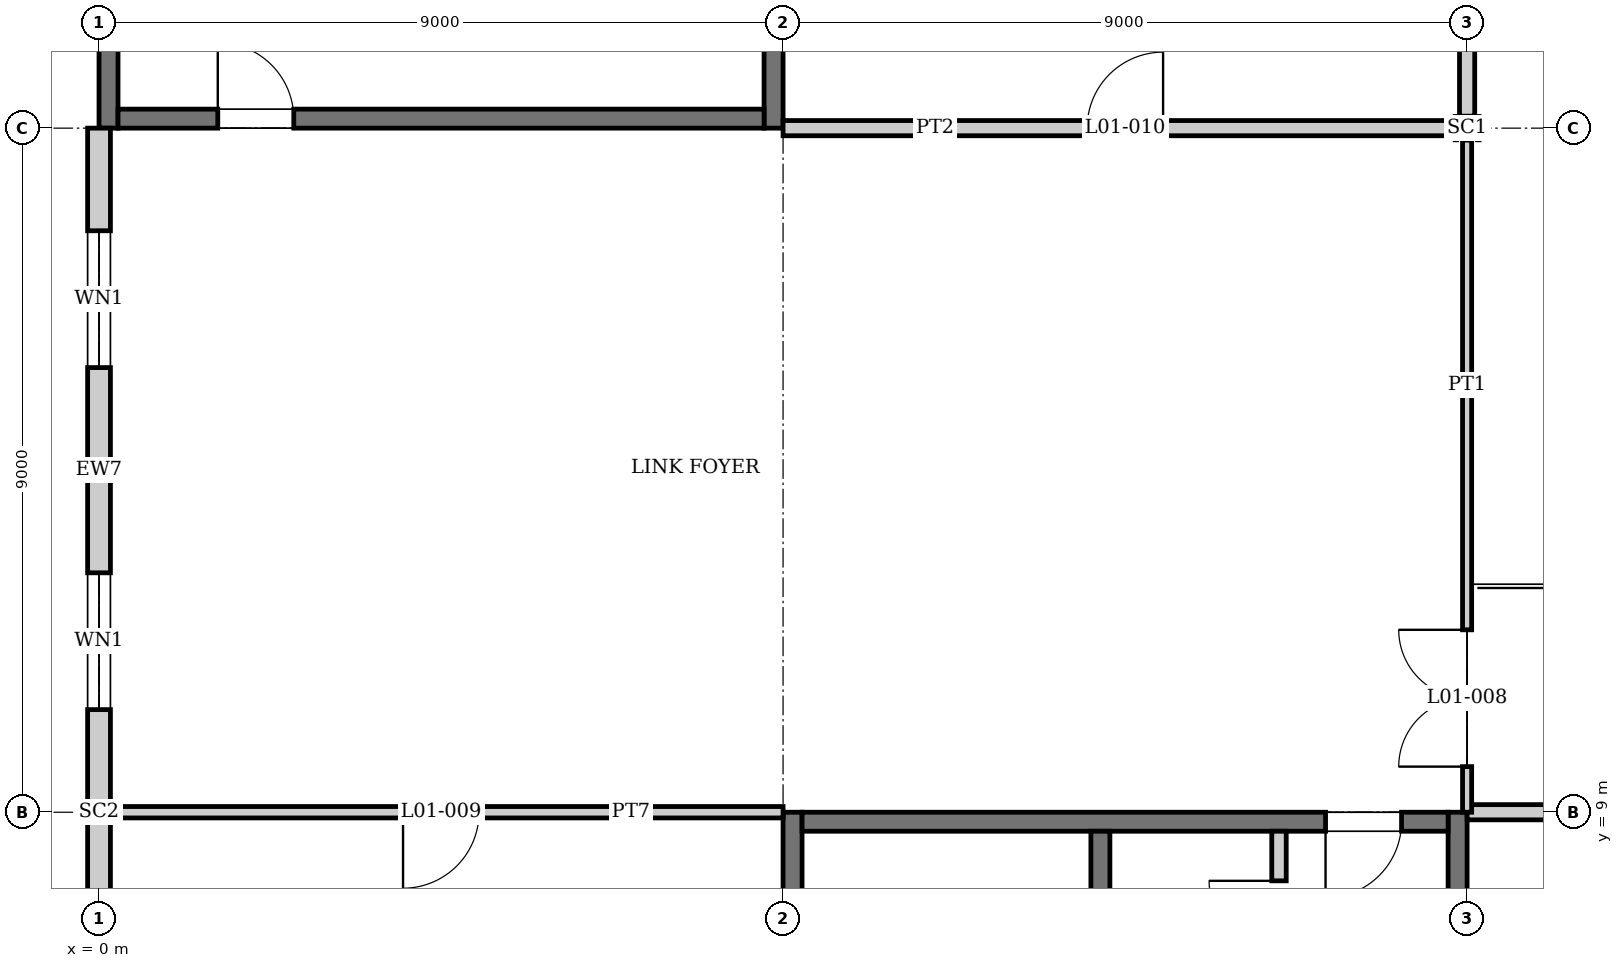
"""IFC4 building model, lengths in metres.
Left out: names, types, materials, properties, quantities, classifications, styles, units other than length and angle.
Written with IfcOpenShell. Run it as: python <this file> out.ifc"""

import sys

from ifc_helpers import new_model, si_unit, direction, frame, frame_2d, origin, origin_2d, place, context, subcontext, project, spatial, rectangle, i_section, extrude, element, fill, save


model = new_model("IFC4")
c1 = context("Model", 3, precision=1e-05, world=origin(), true_north=direction((0.0, 1.0)))
c2 = subcontext(c1, "Body", "Model", "MODEL_VIEW")
j1 = project(units=[si_unit("LENGTHUNIT", "METRE"), si_unit("PLANEANGLEUNIT", "RADIAN")], contexts=[c1])
p1 = place(None, origin())
s1 = spatial("IfcSite", under=j1, at=p1, CompositionType="ELEMENT")
p2 = place(p1, origin())
s2 = spatial("IfcBuilding", under=s1, at=p2, CompositionType="ELEMENT")
p3 = place(p2, frame((0.0, 0.0, 6.0)))
s3 = spatial("IfcBuildingStorey", under=s2, at=p3, CompositionType="ELEMENT", Elevation=6.0)
p4 = place(p3, frame((0.0, 9.0, 0.0), z_axis=(0.0, 0.0, 1.0), x_axis=(0.0, 1.0, 0.0)))
e1 = element("IfcColumn", 1, at=p4, inside=s3, PredefinedType="COLUMN", context=c2, shape_type="SweptSolid", body=[
    extrude(i_section(OverallWidth=0.256, OverallDepth=0.26, WebThickness=0.01, FlangeThickness=0.017, at=origin_2d()), origin(), (0.0, 0.0, 1.0), 4.5),
])
p5 = place(p3, frame((18.0, 18.0, 0.0), z_axis=(0.0, 0.0, 1.0), x_axis=(0.0, 1.0, 0.0)))
e2 = element("IfcColumn", 2, at=p5, inside=s3, PredefinedType="COLUMN", context=c2, shape_type="SweptSolid", body=[
    extrude(i_section(OverallWidth=0.307, OverallDepth=0.315, WebThickness=0.012, FlangeThickness=0.019, at=origin_2d()), origin(), (0.0, 0.0, 1.0), 4.5),
])
for number, where, z_axis, x_axis in (
    (3, (9.125, 0.0, 0.0), (0.0, 0.0, 1.0), (0.0, 1.0, 0.0)),
    (4, (17.875, 0.0, 0.0), (0.0, 0.0, 1.0), (0.0, 1.0, 0.0)),
):
    element("IfcWall", number, at=place(p3, frame(where, z_axis=z_axis, x_axis=x_axis)), inside=s3, PredefinedType="SHEAR", context=c2, shape_type="SweptSolid", body=[
        extrude(rectangle(XDim=9.0, YDim=0.25, at=frame_2d((4.5, 0.0))), origin(), (0.0, 0.0, 1.0), 4.5),
    ])
p6 = place(p3, frame((9.25, 8.875, 0.0), z_axis=(0.0, 0.0, 1.0), x_axis=(1.0, 0.0, 0.0)))
e5 = element("IfcWall", 5, at=p6, inside=s3, PredefinedType="SHEAR", context=c2, shape_type="SweptSolid", body=[
    extrude(rectangle(XDim=8.5, YDim=0.25, at=frame_2d((4.25, 0.0))), origin(), (0.0, 0.0, 1.0), 4.5),
])
p7 = place(p6, frame((6.887, 0.0, 0.0)))
e6 = element("IfcOpeningElement", 6, at=p7, cuts=e5, PredefinedType="OPENING", context=c2, shape_type="SweptSolid", body=[
    extrude(rectangle(XDim=1.0, YDim=2.1, at=frame_2d((0.5, 1.05))), frame((0.0, 0.135, 0.0), z_axis=(0.0, -1.0, 0.0), x_axis=(1.0, 0.0, 0.0)), (0.0, 0.0, 1.0), 0.27),
])
for number, where, z_axis, x_axis in (
    (7, (0.125, 18.0, 0.0), (0.0, 0.0, 1.0), (0.0, 1.0, 0.0)),
    (8, (8.875, 18.0, 0.0), (0.0, 0.0, 1.0), (0.0, 1.0, 0.0)),
):
    element("IfcWall", number, at=place(p3, frame(where, z_axis=z_axis, x_axis=x_axis)), inside=s3, PredefinedType="SHEAR", context=c2, shape_type="SweptSolid", body=[
        extrude(rectangle(XDim=9.0, YDim=0.25, at=frame_2d((4.5, 0.0))), origin(), (0.0, 0.0, 1.0), 4.5),
    ])
p8 = place(p3, frame((0.25, 18.125, 0.0), z_axis=(0.0, 0.0, 1.0), x_axis=(1.0, 0.0, 0.0)))
e9 = element("IfcWall", 9, at=p8, inside=s3, PredefinedType="SHEAR", context=c2, shape_type="SweptSolid", body=[
    extrude(rectangle(XDim=8.5, YDim=0.25, at=frame_2d((4.25, 0.0))), origin(), (0.0, 0.0, 1.0), 4.5),
])
p9 = place(p8, frame((1.312, 0.0, 0.0)))
e10 = element("IfcOpeningElement", 10, at=p9, cuts=e9, PredefinedType="OPENING", context=c2, shape_type="SweptSolid", body=[
    extrude(rectangle(XDim=1.0, YDim=2.1, at=frame_2d((0.5, 1.05))), frame((0.0, 0.135, 0.0), z_axis=(0.0, -1.0, 0.0), x_axis=(1.0, 0.0, 0.0)), (0.0, 0.0, 1.0), 0.27),
])
p10 = place(p3, frame((0.0, 0.128, 0.0), z_axis=(0.0, 0.0, 1.0), x_axis=(0.0, 1.0, 0.0)))
e11 = element("IfcWall", 11, at=p10, inside=s3, PredefinedType="SOLIDWALL", context=c2, shape_type="SweptSolid", body=[
    extrude(rectangle(XDim=8.744, YDim=0.3, at=frame_2d((4.372, 0.0))), origin(), (0.0, 0.0, 1.0), 3.947),
])
p11 = place(p10, frame((0.922, 0.0, 0.9)))
e12 = element("IfcOpeningElement", 12, at=p11, cuts=e11, PredefinedType="OPENING", context=c2, shape_type="SweptSolid", body=[
    extrude(rectangle(XDim=2.4, YDim=2.1, at=frame_2d((1.2, 1.05))), frame((0.0, 0.16, 0.0), z_axis=(0.0, -1.0, 0.0), x_axis=(1.0, 0.0, 0.0)), (0.0, 0.0, 1.0), 0.32),
])
p12 = place(p10, frame((5.422, 0.0, 0.9)))
e13 = element("IfcOpeningElement", 13, at=p12, cuts=e11, PredefinedType="OPENING", context=c2, shape_type="SweptSolid", body=[
    extrude(rectangle(XDim=2.4, YDim=2.1, at=frame_2d((1.2, 1.05))), frame((0.0, 0.16, 0.0), z_axis=(0.0, -1.0, 0.0), x_axis=(1.0, 0.0, 0.0)), (0.0, 0.0, 1.0), 0.32),
])
p13 = place(p3, frame((0.0, 9.128, 0.0), z_axis=(0.0, 0.0, 1.0), x_axis=(0.0, 1.0, 0.0)))
e14 = element("IfcWall", 14, at=p13, inside=s3, PredefinedType="SOLIDWALL", context=c2, shape_type="SweptSolid", body=[
    extrude(rectangle(XDim=8.872, YDim=0.3, at=frame_2d((4.436, 0.0))), origin(), (0.0, 0.0, 1.0), 3.947),
])
p14 = place(p13, frame((1.222, 0.0, 0.9)))
e15 = element("IfcOpeningElement", 15, at=p14, cuts=e14, PredefinedType="OPENING", context=c2, shape_type="SweptSolid", body=[
    extrude(rectangle(XDim=1.8, YDim=2.4, at=frame_2d((0.9, 1.2))), frame((0.0, 0.16, 0.0), z_axis=(0.0, -1.0, 0.0), x_axis=(1.0, 0.0, 0.0)), (0.0, 0.0, 1.0), 0.32),
])
p15 = place(p13, frame((5.722, 0.0, 0.9)))
e16 = element("IfcOpeningElement", 16, at=p15, cuts=e14, PredefinedType="OPENING", context=c2, shape_type="SweptSolid", body=[
    extrude(rectangle(XDim=1.8, YDim=2.4, at=frame_2d((0.9, 1.2))), frame((0.0, 0.16, 0.0), z_axis=(0.0, -1.0, 0.0), x_axis=(1.0, 0.0, 0.0)), (0.0, 0.0, 1.0), 0.32),
])
p16 = place(p3, frame((13.175, 0.25, 0.0), z_axis=(0.0, 0.0, 1.0), x_axis=(0.0, 1.0, 0.0)))
e17 = element("IfcWall", 17, at=p16, inside=s3, PredefinedType="SOLIDWALL", context=c2, shape_type="SweptSolid", body=[
    extrude(rectangle(XDim=8.5, YDim=0.25, at=frame_2d((4.25, 0.0))), origin(), (0.0, 0.0, 1.0), 4.25),
])
p17 = place(p16, frame((0.35, 0.0, 0.0)))
e18 = element("IfcOpeningElement", 18, at=p17, cuts=e17, PredefinedType="OPENING", context=c2, shape_type="SweptSolid", body=[
    extrude(rectangle(XDim=1.1, YDim=2.1, at=frame_2d((0.55, 1.05))), frame((0.0, 0.135, 0.0), z_axis=(0.0, -1.0, 0.0), x_axis=(1.0, 0.0, 0.0)), (0.0, 0.0, 1.0), 0.27),
])
p18 = place(p3, frame((0.13, 9.0, 0.0), z_axis=(0.0, 0.0, 1.0), x_axis=(1.0, 0.0, 0.0)))
e19 = element("IfcWall", 19, at=p18, inside=s3, PredefinedType="PARTITIONING", context=c2, shape_type="SweptSolid", body=[
    extrude(rectangle(XDim=8.87, YDim=0.15, at=frame_2d((4.435, 0.0))), origin(), (0.0, 0.0, 1.0), 3.822),
])
p19 = place(p18, frame((3.87, 0.0, 0.0)))
e20 = element("IfcOpeningElement", 20, at=p19, cuts=e19, PredefinedType="OPENING", context=c2, shape_type="SweptSolid", body=[
    extrude(rectangle(XDim=1.0, YDim=2.1, at=frame_2d((0.5, 1.05))), frame((0.0, 0.085, 0.0), z_axis=(0.0, -1.0, 0.0), x_axis=(1.0, 0.0, 0.0)), (0.0, 0.0, 1.0), 0.17),
])
p20 = place(p3, frame((18.0, 9.0, 0.0), z_axis=(0.0, 0.0, 1.0), x_axis=(1.0, 0.0, 0.0)))
e21 = element("IfcWall", 21, at=p20, inside=s3, PredefinedType="PARTITIONING", context=c2, shape_type="SweptSolid", body=[
    extrude(rectangle(XDim=8.843, YDim=0.2, at=frame_2d((4.421, 0.0))), origin(), (0.0, 0.0, 1.0), 3.991),
])
p21 = place(p20, frame((3.75, 0.0, 0.0)))
e22 = element("IfcOpeningElement", 22, at=p21, cuts=e21, PredefinedType="OPENING", context=c2, shape_type="SweptSolid", body=[
    extrude(rectangle(XDim=1.5, YDim=2.1, at=frame_2d((0.75, 1.05))), frame((0.0, 0.11, 0.0), z_axis=(0.0, -1.0, 0.0), x_axis=(1.0, 0.0, 0.0)), (0.0, 0.0, 1.0), 0.22),
])
p22 = place(p3, frame((9.0, 18.0, 0.0), z_axis=(0.0, 0.0, 1.0), x_axis=(1.0, 0.0, 0.0)))
e23 = element("IfcWall", 23, at=p22, inside=s3, PredefinedType="PARTITIONING", context=c2, shape_type="SweptSolid", body=[
    extrude(rectangle(XDim=8.843, YDim=0.2, at=frame_2d((4.421, 0.0))), origin(), (0.0, 0.0, 1.0), 3.822),
])
p23 = place(p22, frame((4.0, 0.0, 0.0)))
e24 = element("IfcOpeningElement", 24, at=p23, cuts=e23, PredefinedType="OPENING", context=c2, shape_type="SweptSolid", body=[
    extrude(rectangle(XDim=1.0, YDim=2.1, at=frame_2d((0.5, 1.05))), frame((0.0, 0.11, 0.0), z_axis=(0.0, -1.0, 0.0), x_axis=(1.0, 0.0, 0.0)), (0.0, 0.0, 1.0), 0.22),
])
p24 = place(p3, frame((15.525, 6.4, 0.0), z_axis=(0.0, 0.0, 1.0), x_axis=(0.0, 1.0, 0.0)))
e25 = element("IfcWall", 25, at=p24, inside=s3, PredefinedType="PARTITIONING", context=c2, shape_type="SweptSolid", body=[
    extrude(rectangle(XDim=2.35, YDim=0.19, at=frame_2d((1.175, 0.0))), origin(), (0.0, 0.0, 1.0), 4.25),
])
p25 = place(p24, frame((0.778, 0.0, 0.0)))
e26 = element("IfcOpeningElement", 26, at=p25, cuts=e25, PredefinedType="OPENING", context=c2, shape_type="SweptSolid", body=[
    extrude(rectangle(XDim=0.92, YDim=2.1, at=frame_2d((0.46, 1.05))), frame((0.0, 0.105, 0.0), z_axis=(0.0, -1.0, 0.0), x_axis=(1.0, 0.0, 0.0)), (0.0, 0.0, 1.0), 0.21),
])
p26 = place(p3, frame((18.0, 9.0, 0.0), z_axis=(0.0, 0.0, 1.0), x_axis=(0.0, 1.0, 0.0)))
e27 = element("IfcWall", 27, at=p26, inside=s3, PredefinedType="PARTITIONING", context=c2, shape_type="SweptSolid", body=[
    extrude(rectangle(XDim=8.843, YDim=0.12, at=frame_2d((4.421, 0.0))), origin(), (0.0, 0.0, 1.0), 3.991),
])
p27 = place(p26, frame((0.6, 0.0, 0.0)))
e28 = element("IfcOpeningElement", 28, at=p27, cuts=e27, PredefinedType="OPENING", context=c2, shape_type="SweptSolid", body=[
    extrude(rectangle(XDim=1.8, YDim=2.1, at=frame_2d((0.9, 1.05))), frame((0.0, 0.07, 0.0), z_axis=(0.0, -1.0, 0.0), x_axis=(1.0, 0.0, 0.0)), (0.0, 0.0, 1.0), 0.14),
])
p28 = place(p3, frame((18.0, 18.157, 0.0), z_axis=(0.0, 0.0, 1.0), x_axis=(0.0, 1.0, 0.0)))
e29 = element("IfcWall", 29, at=p28, inside=s3, PredefinedType="PARTITIONING", context=c2, shape_type="SweptSolid", body=[
    extrude(rectangle(XDim=8.685, YDim=0.2, at=frame_2d((4.343, 0.0))), origin(), (0.0, 0.0, 1.0), 3.947),
])
p29 = place(p14, origin())
e30 = element("IfcWindow", 30, at=p29, inside=s3, PartitioningType="SINGLE_PANEL", PredefinedType="WINDOW", context=c2, shape_type="SweptSolid", body=[
    extrude(rectangle(XDim=1.8, YDim=2.4, at=frame_2d((0.9, 1.2))), frame((0.0, 0.03, 0.0), z_axis=(0.0, -1.0, 0.0), x_axis=(1.0, 0.0, 0.0)), (0.0, 0.0, 1.0), 0.06),
])
fill(e15, e30)
p30 = place(p15, origin())
e31 = element("IfcWindow", 31, at=p30, inside=s3, PartitioningType="SINGLE_PANEL", PredefinedType="WINDOW", context=c2, shape_type="SweptSolid", body=[
    extrude(rectangle(XDim=1.8, YDim=2.4, at=frame_2d((0.9, 1.2))), frame((0.0, 0.03, 0.0), z_axis=(0.0, -1.0, 0.0), x_axis=(1.0, 0.0, 0.0)), (0.0, 0.0, 1.0), 0.06),
])
fill(e16, e31)
p31 = place(p27, origin())
e32 = element("IfcDoor", 32, at=p31, inside=s3, OperationType="DOUBLE_DOOR_SINGLE_SWING", PredefinedType="DOOR", context=c2, shape_type="SweptSolid", body=[
    extrude(rectangle(XDim=1.8, YDim=2.1, at=frame_2d((0.9, 1.05))), frame((0.0, 0.025, 0.0), z_axis=(0.0, -1.0, 0.0), x_axis=(1.0, 0.0, 0.0)), (0.0, 0.0, 1.0), 0.05),
])
fill(e28, e32)
p32 = place(p19, frame((1.0, 0.0, 0.0), z_axis=(0.0, 0.0, 1.0), x_axis=(-1.0, 0.0, 0.0)))
e33 = element("IfcDoor", 33, at=p32, inside=s3, OperationType="SINGLE_SWING_RIGHT", PredefinedType="DOOR", context=c2, shape_type="SweptSolid", body=[
    extrude(rectangle(XDim=1.0, YDim=2.1, at=frame_2d((0.5, 1.05))), frame((0.0, 0.025, 0.0), z_axis=(0.0, -1.0, 0.0), x_axis=(1.0, 0.0, 0.0)), (0.0, 0.0, 1.0), 0.05),
])
fill(e20, e33)
p33 = place(p23, origin())
e34 = element("IfcDoor", 34, at=p33, inside=s3, OperationType="SINGLE_SWING_RIGHT", PredefinedType="DOOR", context=c2, shape_type="SweptSolid", body=[
    extrude(rectangle(XDim=1.0, YDim=2.1, at=frame_2d((0.5, 1.05))), frame((0.0, 0.025, 0.0), z_axis=(0.0, -1.0, 0.0), x_axis=(1.0, 0.0, 0.0)), (0.0, 0.0, 1.0), 0.05),
])
fill(e24, e34)
p34 = place(p7, frame((1.0, 0.0, 0.0), z_axis=(0.0, 0.0, 1.0), x_axis=(-1.0, 0.0, 0.0)))
e35 = element("IfcDoor", 35, at=p34, inside=s3, OperationType="SINGLE_SWING_RIGHT", PredefinedType="DOOR", context=c2, shape_type="SweptSolid", body=[
    extrude(rectangle(XDim=1.0, YDim=2.1, at=frame_2d((0.5, 1.05))), frame((0.0, 0.025, 0.0), z_axis=(0.0, -1.0, 0.0), x_axis=(1.0, 0.0, 0.0)), (0.0, 0.0, 1.0), 0.05),
])
fill(e6, e35)
p35 = place(p25, origin())
e36 = element("IfcDoor", 36, at=p35, inside=s3, OperationType="SINGLE_SWING_RIGHT", PredefinedType="DOOR", context=c2, shape_type="SweptSolid", body=[
    extrude(rectangle(XDim=0.92, YDim=2.1, at=frame_2d((0.46, 1.05))), frame((0.0, 0.025, 0.0), z_axis=(0.0, -1.0, 0.0), x_axis=(1.0, 0.0, 0.0)), (0.0, 0.0, 1.0), 0.05),
])
fill(e26, e36)
p36 = place(p9, origin())
e37 = element("IfcDoor", 37, at=p36, inside=s3, OperationType="SINGLE_SWING_LEFT", PredefinedType="DOOR", context=c2, shape_type="SweptSolid", body=[
    extrude(rectangle(XDim=1.0, YDim=2.1, at=frame_2d((0.5, 1.05))), frame((0.0, 0.025, 0.0), z_axis=(0.0, -1.0, 0.0), x_axis=(1.0, 0.0, 0.0)), (0.0, 0.0, 1.0), 0.05),
])
fill(e10, e37)
save(model, sys.argv[1])
